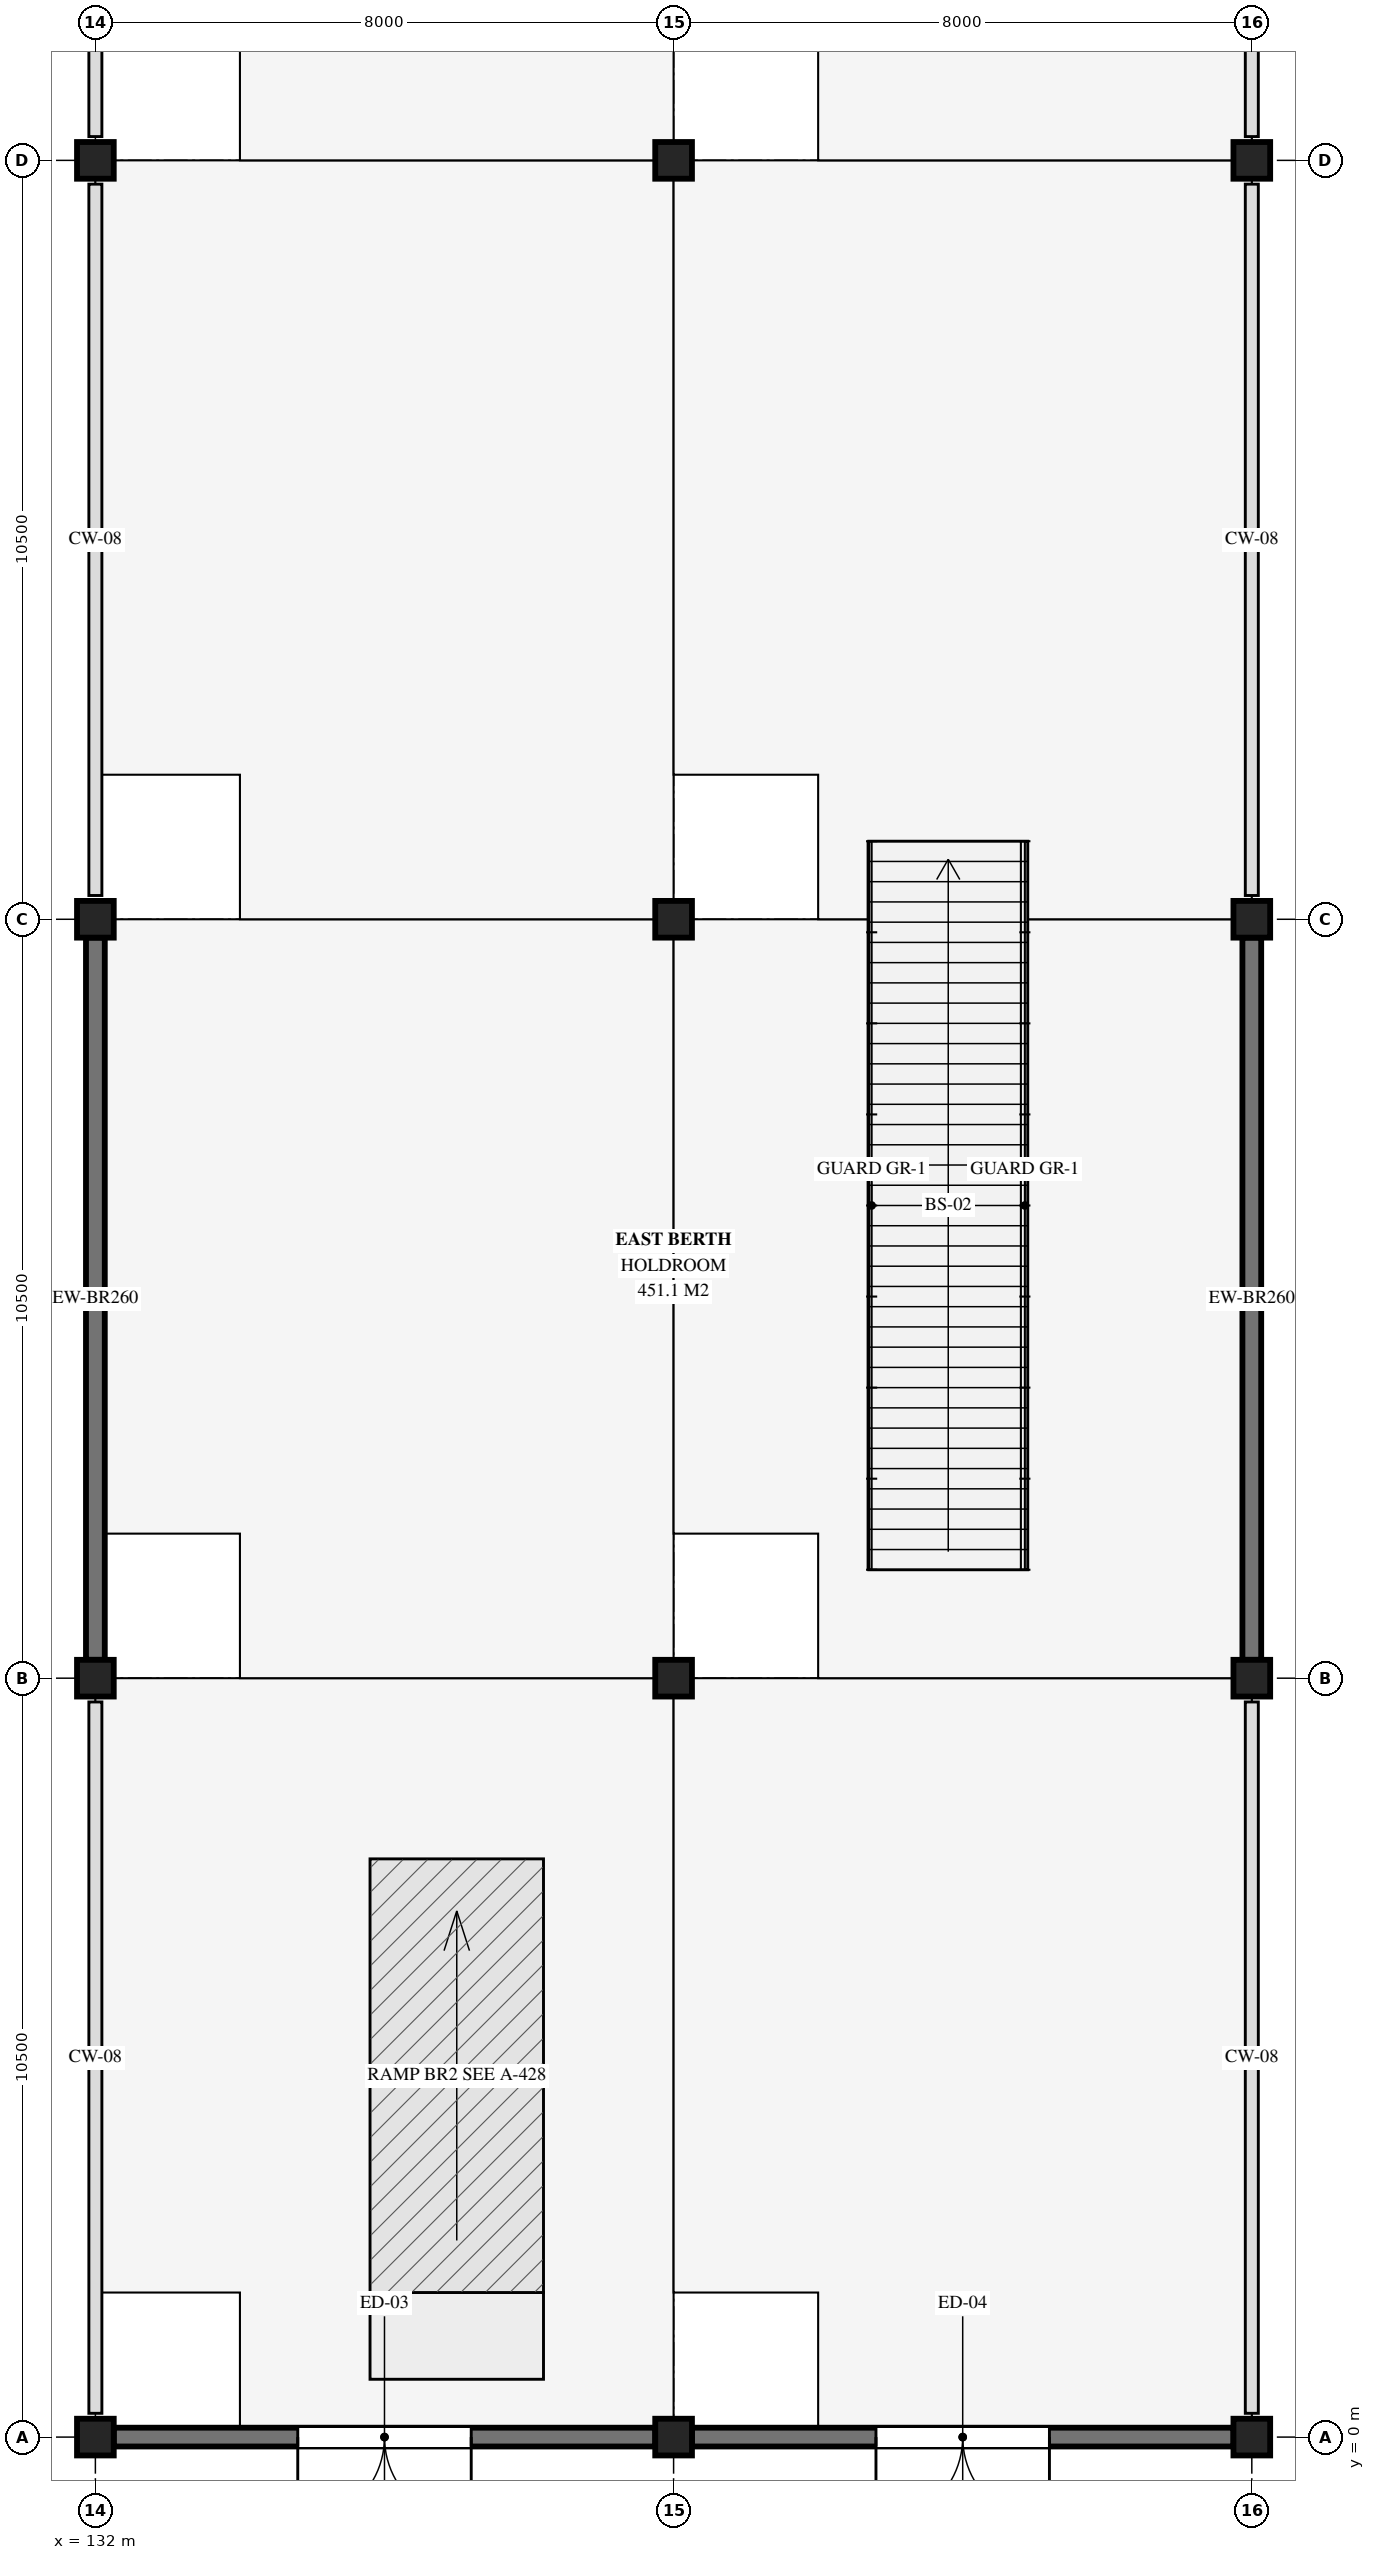
"""IFC4 building model, lengths in metres.
Left out: names, types, materials, properties, quantities, classifications, styles, units other than length and angle.
Written with IfcOpenShell. Run it as: python <this file> out.ifc"""

import sys

from ifc_helpers import new_model, si_unit, direction, frame, frame_2d, origin, origin_2d, place, context, subcontext, project, spatial, rectangle, hollow_circle, extrude, element, fill, save


model = new_model("IFC4")
c1 = context("Model", 3, precision=1e-05, world=origin(), true_north=direction((0.0, 1.0)))
c2 = subcontext(c1, "Body", "Model", "MODEL_VIEW")
j1 = project(units=[si_unit("LENGTHUNIT", "METRE"), si_unit("PLANEANGLEUNIT", "RADIAN")], contexts=[c1])
p1 = place(None, origin())
s1 = spatial("IfcSite", under=j1, at=p1, CompositionType="ELEMENT")
p2 = place(p1, origin())
s2 = spatial("IfcBuilding", under=s1, at=p2, CompositionType="ELEMENT")
p3 = place(p2, origin())
s3 = spatial("IfcBuildingStorey", under=s2, at=p3, CompositionType="ELEMENT", Elevation=0.0)
for number, where, z_axis, x_axis in (
    (1, (132.0, 0.0, 0.0), (0.0, 0.0, 1.0), (1.0, 0.0, 0.0)),
    (2, (132.0, 10.5, 0.0), (0.0, 0.0, 1.0), (1.0, 0.0, 0.0)),
    (3, (132.0, 21.0, 0.0), (0.0, 0.0, 1.0), (1.0, 0.0, 0.0)),
    (4, (132.0, 31.5, 0.0), (0.0, 0.0, 1.0), (1.0, 0.0, 0.0)),
    (5, (140.0, 0.0, 0.0), (0.0, 0.0, 1.0), (1.0, 0.0, 0.0)),
    (6, (140.0, 10.5, 0.0), (0.0, 0.0, 1.0), (1.0, 0.0, 0.0)),
    (7, (140.0, 21.0, 0.0), (0.0, 0.0, 1.0), (1.0, 0.0, 0.0)),
    (8, (140.0, 31.5, 0.0), (0.0, 0.0, 1.0), (1.0, 0.0, 0.0)),
    (9, (148.0, 0.0, 0.0), (0.0, 0.0, 1.0), (1.0, 0.0, 0.0)),
    (10, (148.0, 10.5, 0.0), (0.0, 0.0, 1.0), (1.0, 0.0, 0.0)),
    (11, (148.0, 21.0, 0.0), (0.0, 0.0, 1.0), (1.0, 0.0, 0.0)),
    (12, (148.0, 31.5, 0.0), (0.0, 0.0, 1.0), (1.0, 0.0, 0.0)),
):
    element("IfcColumn", number, at=place(p3, frame(where, z_axis=z_axis, x_axis=x_axis)), inside=s3, PredefinedType="COLUMN", context=c2, shape_type="SweptSolid", body=[
        extrude(hollow_circle(Radius=0.254, WallThickness=0.02, at=origin_2d()), origin(), (0.0, 0.0, 1.0), 5.24),
    ])
for number, where, z_axis, x_axis in (
    (13, (132.0, 10.754, 0.0), (0.0, 0.0, 1.0), (0.0, 1.0, 0.0)),
    (14, (148.0, 10.754, 0.0), (0.0, 0.0, 1.0), (0.0, 1.0, 0.0)),
):
    element("IfcWall", number, at=place(p3, frame(where, z_axis=z_axis, x_axis=x_axis)), inside=s3, PredefinedType="SOLIDWALL", context=c2, shape_type="SweptSolid", body=[
        extrude(rectangle(XDim=9.992, YDim=0.26, at=frame_2d((4.996, 0.0))), origin(), (0.0, 0.0, 1.0), 5.06),
    ])
p4 = place(p3, frame((139.746, 0.0, 0.0), z_axis=(0.0, 0.0, 1.0), x_axis=(-1.0, 0.0, 0.0)))
e15 = element("IfcWall", 15, at=p4, inside=s3, PredefinedType="SOLIDWALL", context=c2, shape_type="SweptSolid", body=[
    extrude(rectangle(XDim=7.492, YDim=0.26, at=frame_2d((3.746, 0.0))), origin(), (0.0, 0.0, 1.0), 5.06),
])
p5 = place(p4, frame((2.546, 0.0, 0.0)))
e16 = element("IfcOpeningElement", 16, at=p5, cuts=e15, PredefinedType="OPENING", context=c2, shape_type="SweptSolid", body=[
    extrude(rectangle(XDim=2.4, YDim=2.3, at=frame_2d((1.2, 1.15))), frame((0.0, 0.14, 0.0), z_axis=(0.0, -1.0, 0.0), x_axis=(1.0, 0.0, 0.0)), (0.0, 0.0, 1.0), 0.28),
])
p6 = place(p3, frame((147.746, 0.0, 0.0), z_axis=(0.0, 0.0, 1.0), x_axis=(-1.0, 0.0, 0.0)))
e17 = element("IfcWall", 17, at=p6, inside=s3, PredefinedType="SOLIDWALL", context=c2, shape_type="SweptSolid", body=[
    extrude(rectangle(XDim=7.492, YDim=0.26, at=frame_2d((3.746, 0.0))), origin(), (0.0, 0.0, 1.0), 5.06),
])
p7 = place(p6, frame((2.546, 0.0, 0.0)))
e18 = element("IfcOpeningElement", 18, at=p7, cuts=e17, PredefinedType="OPENING", context=c2, shape_type="SweptSolid", body=[
    extrude(rectangle(XDim=2.4, YDim=2.3, at=frame_2d((1.2, 1.15))), frame((0.0, 0.14, 0.0), z_axis=(0.0, -1.0, 0.0), x_axis=(1.0, 0.0, 0.0)), (0.0, 0.0, 1.0), 0.28),
])
p8 = place(p5, origin())
e19 = element("IfcDoor", 19, at=p8, inside=s3, OperationType="DOUBLE_DOOR_SINGLE_SWING", PredefinedType="DOOR", context=c2, shape_type="SweptSolid", body=[
    extrude(rectangle(XDim=2.4, YDim=2.3, at=frame_2d((1.2, 1.15))), frame((0.0, 0.025, 0.0), z_axis=(0.0, -1.0, 0.0), x_axis=(1.0, 0.0, 0.0)), (0.0, 0.0, 1.0), 0.05),
])
fill(e16, e19)
p9 = place(p7, origin())
e20 = element("IfcDoor", 20, at=p9, inside=s3, OperationType="DOUBLE_DOOR_SINGLE_SWING", PredefinedType="DOOR", context=c2, shape_type="SweptSolid", body=[
    extrude(rectangle(XDim=2.4, YDim=2.3, at=frame_2d((1.2, 1.15))), frame((0.0, 0.025, 0.0), z_axis=(0.0, -1.0, 0.0), x_axis=(1.0, 0.0, 0.0)), (0.0, 0.0, 1.0), 0.05),
])
fill(e18, e20)
save(model, sys.argv[1])
